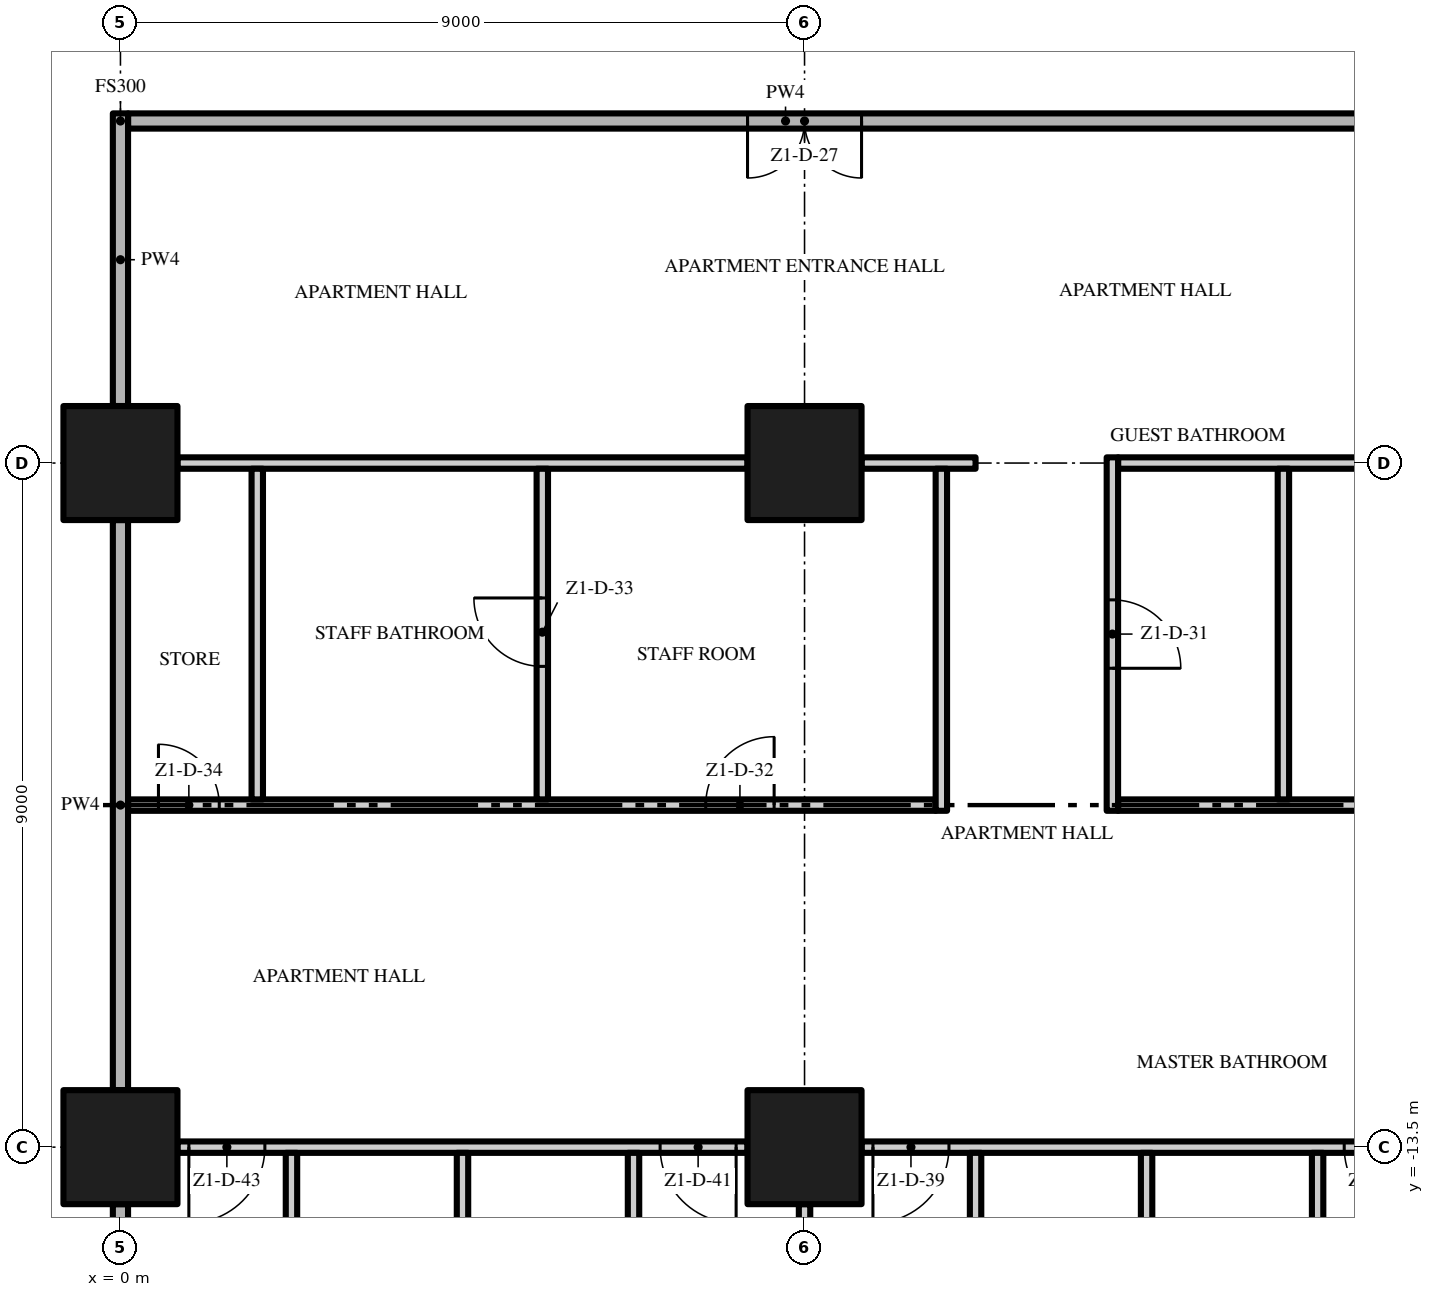
"""IFC4 building model, lengths in metres.
Left out: names, types, materials, properties, quantities, classifications, styles, units other than length and angle.
Written with IfcOpenShell. Run it as: python <this file> out.ifc"""

import sys

from ifc_helpers import new_model, si_unit, direction, frame, frame_2d, origin, origin_2d, place, context, subcontext, project, spatial, rectangle, extrude, element, fill, save


model = new_model("IFC4")
c1 = context("Model", 3, precision=1e-05, world=origin(), true_north=direction((0.0, 1.0)))
c2 = subcontext(c1, "Body", "Model", "MODEL_VIEW")
j1 = project(units=[si_unit("LENGTHUNIT", "METRE"), si_unit("PLANEANGLEUNIT", "RADIAN")], contexts=[c1])
p1 = place(None, origin())
s1 = spatial("IfcSite", under=j1, at=p1, CompositionType="ELEMENT")
p2 = place(p1, origin())
s2 = spatial("IfcBuilding", under=s1, at=p2, CompositionType="ELEMENT")
p3 = place(p2, frame((0.0, 0.0, 53.0)))
s3 = spatial("IfcBuildingStorey", under=s2, at=p3, CompositionType="ELEMENT", Elevation=53.0)
for number, where, z_axis, x_axis in (
    (1, (0.0, -13.5, 0.0), (0.0, 0.0, 1.0), (1.0, 0.0, 0.0)),
    (2, (0.0, -4.5, 0.0), (0.0, 0.0, 1.0), (1.0, 0.0, 0.0)),
    (3, (9.0, -13.5, 0.0), (0.0, 0.0, 1.0), (1.0, 0.0, 0.0)),
    (4, (9.0, -4.5, 0.0), (0.0, 0.0, 1.0), (1.0, 0.0, 0.0)),
):
    element("IfcColumn", number, at=place(p3, frame(where, z_axis=z_axis, x_axis=x_axis)), inside=s3, PredefinedType="COLUMN", context=c2, shape_type="SweptSolid", body=[
        extrude(rectangle(XDim=1.5, YDim=1.5, at=origin_2d()), origin(), (0.0, 0.0, 1.0), 3.5),
    ])
p4 = place(p3, frame((8.25, -13.5, 0.0), z_axis=(0.0, 0.0, 1.0), x_axis=(-1.0, 0.0, 0.0)))
e5 = element("IfcWall", 5, at=p4, inside=s3, PredefinedType="PARTITIONING", context=c2, shape_type="SweptSolid", body=[
    extrude(rectangle(XDim=7.5, YDim=0.15, at=frame_2d((3.75, 0.0))), origin(), (0.0, 0.0, 1.0), 3.5),
])
p5 = place(p4, frame((0.15, 0.0, 0.0)))
e6 = element("IfcOpeningElement", 6, at=p5, cuts=e5, PredefinedType="OPENING", context=c2, shape_type="SweptSolid", body=[
    extrude(rectangle(XDim=1.0, YDim=2.4, at=frame_2d((0.5, 1.2))), frame((0.0, 0.085, 0.0), z_axis=(0.0, -1.0, 0.0), x_axis=(1.0, 0.0, 0.0)), (0.0, 0.0, 1.0), 0.17),
])
p6 = place(p4, frame((6.35, 0.0, 0.0)))
e7 = element("IfcOpeningElement", 7, at=p6, cuts=e5, PredefinedType="OPENING", context=c2, shape_type="SweptSolid", body=[
    extrude(rectangle(XDim=1.0, YDim=2.4, at=frame_2d((0.5, 1.2))), frame((0.0, 0.085, 0.0), z_axis=(0.0, -1.0, 0.0), x_axis=(1.0, 0.0, 0.0)), (0.0, 0.0, 1.0), 0.17),
])
p7 = place(p3, frame((17.25, -13.5, 0.0), z_axis=(0.0, 0.0, 1.0), x_axis=(-1.0, 0.0, 0.0)))
e8 = element("IfcWall", 8, at=p7, inside=s3, PredefinedType="PARTITIONING", context=c2, shape_type="SweptSolid", body=[
    extrude(rectangle(XDim=7.5, YDim=0.15, at=frame_2d((3.75, 0.0))), origin(), (0.0, 0.0, 1.0), 3.5),
])
p8 = place(p7, frame((0.15, 0.0, 0.0)))
e9 = element("IfcOpeningElement", 9, at=p8, cuts=e8, PredefinedType="OPENING", context=c2, shape_type="SweptSolid", body=[
    extrude(rectangle(XDim=1.0, YDim=2.4, at=frame_2d((0.5, 1.2))), frame((0.0, 0.085, 0.0), z_axis=(0.0, -1.0, 0.0), x_axis=(1.0, 0.0, 0.0)), (0.0, 0.0, 1.0), 0.17),
])
p9 = place(p7, frame((6.35, 0.0, 0.0)))
e10 = element("IfcOpeningElement", 10, at=p9, cuts=e8, PredefinedType="OPENING", context=c2, shape_type="SweptSolid", body=[
    extrude(rectangle(XDim=1.0, YDim=2.4, at=frame_2d((0.5, 1.2))), frame((0.0, 0.085, 0.0), z_axis=(0.0, -1.0, 0.0), x_axis=(1.0, 0.0, 0.0)), (0.0, 0.0, 1.0), 0.17),
])
p10 = place(p3, frame((0.1, -9.0, 0.0), z_axis=(0.0, 0.0, 1.0), x_axis=(1.0, 0.0, 0.0)))
e11 = element("IfcWall", 11, at=p10, inside=s3, PredefinedType="PARTITIONING", context=c2, shape_type="SweptSolid", body=[
    extrude(rectangle(XDim=10.625, YDim=0.15, at=frame_2d((5.312, 0.0))), origin(), (0.0, 0.0, 1.0), 3.5),
])
p11 = place(p10, frame((7.6, 0.0, 0.0)))
e12 = element("IfcOpeningElement", 12, at=p11, cuts=e11, PredefinedType="OPENING", context=c2, shape_type="SweptSolid", body=[
    extrude(rectangle(XDim=0.9, YDim=2.1, at=frame_2d((0.45, 1.05))), frame((0.0, 0.085, 0.0), z_axis=(0.0, -1.0, 0.0), x_axis=(1.0, 0.0, 0.0)), (0.0, 0.0, 1.0), 0.17),
])
p12 = place(p10, frame((0.4, 0.0, 0.0)))
e13 = element("IfcOpeningElement", 13, at=p12, cuts=e11, PredefinedType="OPENING", context=c2, shape_type="SweptSolid", body=[
    extrude(rectangle(XDim=0.8, YDim=2.0, at=frame_2d((0.4, 1.0))), frame((0.0, 0.085, 0.0), z_axis=(0.0, -1.0, 0.0), x_axis=(1.0, 0.0, 0.0)), (0.0, 0.0, 1.0), 0.17),
])
p13 = place(p3, frame((13.125, -9.0, 0.0), z_axis=(0.0, 0.0, 1.0), x_axis=(1.0, 0.0, 0.0)))
e14 = element("IfcWall", 14, at=p13, inside=s3, PredefinedType="PARTITIONING", context=c2, shape_type="SweptSolid", body=[
    extrude(rectangle(XDim=13.575, YDim=0.15, at=frame_2d((6.787, 0.0))), origin(), (0.0, 0.0, 1.0), 3.5),
])
p14 = place(p3, frame((0.75, -4.5, 0.0), z_axis=(0.0, 0.0, 1.0), x_axis=(1.0, 0.0, 0.0)))
e15 = element("IfcWall", 15, at=p14, inside=s3, PredefinedType="PARTITIONING", context=c2, shape_type="SweptSolid", body=[
    extrude(rectangle(XDim=7.5, YDim=0.15, at=frame_2d((3.75, 0.0))), origin(), (0.0, 0.0, 1.0), 3.5),
])
p15 = place(p3, frame((9.75, -4.5, 0.0), z_axis=(0.0, 0.0, 1.0), x_axis=(1.0, 0.0, 0.0)))
e16 = element("IfcWall", 16, at=p15, inside=s3, PredefinedType="PARTITIONING", context=c2, shape_type="SweptSolid", body=[
    extrude(rectangle(XDim=1.5, YDim=0.15, at=frame_2d((0.75, 0.0))), origin(), (0.0, 0.0, 1.0), 3.5),
])
p16 = place(p3, frame((13.125, -4.5, 0.0), z_axis=(0.0, 0.0, 1.0), x_axis=(1.0, 0.0, 0.0)))
e17 = element("IfcWall", 17, at=p16, inside=s3, PredefinedType="PARTITIONING", context=c2, shape_type="SweptSolid", body=[
    extrude(rectangle(XDim=4.125, YDim=0.15, at=frame_2d((2.062, 0.0))), origin(), (0.0, 0.0, 1.0), 3.5),
])
p17 = place(p3, frame((17.4, 0.0, 0.0), z_axis=(0.0, 0.0, 1.0), x_axis=(-1.0, 0.0, 0.0)))
e18 = element("IfcWall", 18, at=p17, inside=s3, PredefinedType="PARTITIONING", context=c2, shape_type="SweptSolid", body=[
    extrude(rectangle(XDim=17.3, YDim=0.2, at=frame_2d((8.65, 0.0))), origin(), (0.0, 0.0, 1.0), 3.5),
])
p18 = place(p17, frame((7.65, 0.0, 0.0)))
e19 = element("IfcOpeningElement", 19, at=p18, cuts=e18, PredefinedType="OPENING", context=c2, shape_type="SweptSolid", body=[
    extrude(rectangle(XDim=1.5, YDim=2.4, at=frame_2d((0.75, 1.2))), frame((0.0, 0.11, 0.0), z_axis=(0.0, -1.0, 0.0), x_axis=(1.0, 0.0, 0.0)), (0.0, 0.0, 1.0), 0.22),
])
p19 = place(p3, frame((0.0, -21.1, 0.0), z_axis=(0.0, 0.0, 1.0), x_axis=(0.0, 1.0, 0.0)))
e20 = element("IfcWall", 20, at=p19, inside=s3, PredefinedType="PARTITIONING", context=c2, shape_type="SweptSolid", body=[
    extrude(rectangle(XDim=6.85, YDim=0.2, at=frame_2d((3.425, 0.0))), origin(), (0.0, 0.0, 1.0), 3.5),
])
p20 = place(p3, frame((0.0, -12.75, 0.0), z_axis=(0.0, 0.0, 1.0), x_axis=(0.0, 1.0, 0.0)))
e21 = element("IfcWall", 21, at=p20, inside=s3, PredefinedType="PARTITIONING", context=c2, shape_type="SweptSolid", body=[
    extrude(rectangle(XDim=7.5, YDim=0.2, at=frame_2d((3.75, 0.0))), origin(), (0.0, 0.0, 1.0), 3.5),
])
p21 = place(p3, frame((0.0, -3.75, 0.0), z_axis=(0.0, 0.0, 1.0), x_axis=(0.0, 1.0, 0.0)))
e22 = element("IfcWall", 22, at=p21, inside=s3, PredefinedType="PARTITIONING", context=c2, shape_type="SweptSolid", body=[
    extrude(rectangle(XDim=3.85, YDim=0.2, at=frame_2d((1.925, 0.0))), origin(), (0.0, 0.0, 1.0), 3.5),
])
p22 = place(p3, frame((1.8, -8.925, 0.0), z_axis=(0.0, 0.0, 1.0), x_axis=(0.0, 1.0, 0.0)))
e23 = element("IfcWall", 23, at=p22, inside=s3, PredefinedType="PARTITIONING", context=c2, shape_type="SweptSolid", body=[
    extrude(rectangle(XDim=4.35, YDim=0.15, at=frame_2d((2.175, 0.0))), origin(), (0.0, 0.0, 1.0), 3.5),
])
p23 = place(p3, frame((2.25, -16.575, 0.0), z_axis=(0.0, 0.0, 1.0), x_axis=(0.0, 1.0, 0.0)))
e24 = element("IfcWall", 24, at=p23, inside=s3, PredefinedType="PARTITIONING", context=c2, shape_type="SweptSolid", body=[
    extrude(rectangle(XDim=3.0, YDim=0.15, at=frame_2d((1.5, 0.0))), origin(), (0.0, 0.0, 1.0), 3.5),
])
p24 = place(p3, frame((4.5, -22.2, 0.0), z_axis=(0.0, 0.0, 1.0), x_axis=(0.0, 1.0, 0.0)))
e25 = element("IfcWall", 25, at=p24, inside=s3, PredefinedType="PARTITIONING", context=c2, shape_type="SweptSolid", body=[
    extrude(rectangle(XDim=8.625, YDim=0.15, at=frame_2d((4.312, 0.0))), origin(), (0.0, 0.0, 1.0), 3.5),
])
p25 = place(p3, frame((5.55, -8.925, 0.0), z_axis=(0.0, 0.0, 1.0), x_axis=(0.0, 1.0, 0.0)))
e26 = element("IfcWall", 26, at=p25, inside=s3, PredefinedType="PARTITIONING", context=c2, shape_type="SweptSolid", body=[
    extrude(rectangle(XDim=4.35, YDim=0.15, at=frame_2d((2.175, 0.0))), origin(), (0.0, 0.0, 1.0), 3.5),
])
p26 = place(p25, frame((1.75, 0.0, 0.0)))
e27 = element("IfcOpeningElement", 27, at=p26, cuts=e26, PredefinedType="OPENING", context=c2, shape_type="SweptSolid", body=[
    extrude(rectangle(XDim=0.9, YDim=2.1, at=frame_2d((0.45, 1.05))), frame((0.0, 0.085, 0.0), z_axis=(0.0, -1.0, 0.0), x_axis=(1.0, 0.0, 0.0)), (0.0, 0.0, 1.0), 0.17),
])
p27 = place(p3, frame((6.75, -16.575, 0.0), z_axis=(0.0, 0.0, 1.0), x_axis=(0.0, 1.0, 0.0)))
e28 = element("IfcWall", 28, at=p27, inside=s3, PredefinedType="PARTITIONING", context=c2, shape_type="SweptSolid", body=[
    extrude(rectangle(XDim=3.0, YDim=0.15, at=frame_2d((1.5, 0.0))), origin(), (0.0, 0.0, 1.0), 3.5),
])
p28 = place(p3, frame((9.0, -21.1, 0.0), z_axis=(0.0, 0.0, 1.0), x_axis=(0.0, 1.0, 0.0)))
e29 = element("IfcWall", 29, at=p28, inside=s3, PredefinedType="PARTITIONING", context=c2, shape_type="SweptSolid", body=[
    extrude(rectangle(XDim=6.85, YDim=0.15, at=frame_2d((3.425, 0.0))), origin(), (0.0, 0.0, 1.0), 3.5),
])
p29 = place(p3, frame((10.8, -9.075, 0.0), z_axis=(0.0, 0.0, 1.0), x_axis=(0.0, 1.0, 0.0)))
e30 = element("IfcWall", 30, at=p29, inside=s3, PredefinedType="PARTITIONING", context=c2, shape_type="SweptSolid", body=[
    extrude(rectangle(XDim=4.5, YDim=0.15, at=frame_2d((2.25, 0.0))), origin(), (0.0, 0.0, 1.0), 3.5),
])
p30 = place(p3, frame((11.25, -16.575, 0.0), z_axis=(0.0, 0.0, 1.0), x_axis=(0.0, 1.0, 0.0)))
e31 = element("IfcWall", 31, at=p30, inside=s3, PredefinedType="PARTITIONING", context=c2, shape_type="SweptSolid", body=[
    extrude(rectangle(XDim=3.0, YDim=0.15, at=frame_2d((1.5, 0.0))), origin(), (0.0, 0.0, 1.0), 3.5),
])
p31 = place(p3, frame((13.05, -4.425, 0.0), z_axis=(0.0, 0.0, 1.0), x_axis=(0.0, -1.0, 0.0)))
e32 = element("IfcWall", 32, at=p31, inside=s3, PredefinedType="PARTITIONING", context=c2, shape_type="SweptSolid", body=[
    extrude(rectangle(XDim=4.65, YDim=0.15, at=frame_2d((2.325, 0.0))), origin(), (0.0, 0.0, 1.0), 3.5),
])
p32 = place(p31, frame((1.875, 0.0, 0.0)))
e33 = element("IfcOpeningElement", 33, at=p32, cuts=e32, PredefinedType="OPENING", context=c2, shape_type="SweptSolid", body=[
    extrude(rectangle(XDim=0.9, YDim=2.1, at=frame_2d((0.45, 1.05))), frame((0.0, 0.085, 0.0), z_axis=(0.0, -1.0, 0.0), x_axis=(1.0, 0.0, 0.0)), (0.0, 0.0, 1.0), 0.17),
])
p33 = place(p3, frame((13.5, -22.2, 0.0), z_axis=(0.0, 0.0, 1.0), x_axis=(0.0, 1.0, 0.0)))
e34 = element("IfcWall", 34, at=p33, inside=s3, PredefinedType="PARTITIONING", context=c2, shape_type="SweptSolid", body=[
    extrude(rectangle(XDim=8.625, YDim=0.15, at=frame_2d((4.312, 0.0))), origin(), (0.0, 0.0, 1.0), 3.5),
])
p34 = place(p3, frame((15.3, -8.925, 0.0), z_axis=(0.0, 0.0, 1.0), x_axis=(0.0, 1.0, 0.0)))
e35 = element("IfcWall", 35, at=p34, inside=s3, PredefinedType="PARTITIONING", context=c2, shape_type="SweptSolid", body=[
    extrude(rectangle(XDim=4.35, YDim=0.15, at=frame_2d((2.175, 0.0))), origin(), (0.0, 0.0, 1.0), 3.5),
])
p35 = place(p3, frame((15.75, -16.575, 0.0), z_axis=(0.0, 0.0, 1.0), x_axis=(0.0, 1.0, 0.0)))
e36 = element("IfcWall", 36, at=p35, inside=s3, PredefinedType="PARTITIONING", context=c2, shape_type="SweptSolid", body=[
    extrude(rectangle(XDim=3.0, YDim=0.15, at=frame_2d((1.5, 0.0))), origin(), (0.0, 0.0, 1.0), 3.5),
])
p36 = place(p18, origin())
e37 = element("IfcDoor", 37, at=p36, inside=s3, OperationType="DOUBLE_DOOR_SINGLE_SWING", PredefinedType="DOOR", context=c2, shape_type="SweptSolid", body=[
    extrude(rectangle(XDim=1.5, YDim=2.4, at=frame_2d((0.75, 1.2))), frame((0.0, 0.025, 0.0), z_axis=(0.0, -1.0, 0.0), x_axis=(1.0, 0.0, 0.0)), (0.0, 0.0, 1.0), 0.05),
])
fill(e19, e37)
p37 = place(p32, origin())
e38 = element("IfcDoor", 38, at=p37, inside=s3, OperationType="SINGLE_SWING_RIGHT", PredefinedType="DOOR", context=c2, shape_type="SweptSolid", body=[
    extrude(rectangle(XDim=0.9, YDim=2.1, at=frame_2d((0.45, 1.05))), frame((0.0, 0.025, 0.0), z_axis=(0.0, -1.0, 0.0), x_axis=(1.0, 0.0, 0.0)), (0.0, 0.0, 1.0), 0.05),
])
fill(e33, e38)
p38 = place(p11, origin())
e39 = element("IfcDoor", 39, at=p38, inside=s3, OperationType="SINGLE_SWING_RIGHT", PredefinedType="DOOR", context=c2, shape_type="SweptSolid", body=[
    extrude(rectangle(XDim=0.9, YDim=2.1, at=frame_2d((0.45, 1.05))), frame((0.0, 0.025, 0.0), z_axis=(0.0, -1.0, 0.0), x_axis=(1.0, 0.0, 0.0)), (0.0, 0.0, 1.0), 0.05),
])
fill(e12, e39)
p39 = place(p26, origin())
e40 = element("IfcDoor", 40, at=p39, inside=s3, OperationType="SINGLE_SWING_RIGHT", PredefinedType="DOOR", context=c2, shape_type="SweptSolid", body=[
    extrude(rectangle(XDim=0.9, YDim=2.1, at=frame_2d((0.45, 1.05))), frame((0.0, 0.025, 0.0), z_axis=(0.0, -1.0, 0.0), x_axis=(1.0, 0.0, 0.0)), (0.0, 0.0, 1.0), 0.05),
])
fill(e27, e40)
p40 = place(p12, origin())
e41 = element("IfcDoor", 41, at=p40, inside=s3, OperationType="SINGLE_SWING_LEFT", PredefinedType="DOOR", context=c2, shape_type="SweptSolid", body=[
    extrude(rectangle(XDim=0.8, YDim=2.0, at=frame_2d((0.4, 1.0))), frame((0.0, 0.025, 0.0), z_axis=(0.0, -1.0, 0.0), x_axis=(1.0, 0.0, 0.0)), (0.0, 0.0, 1.0), 0.05),
])
fill(e13, e41)
p41 = place(p8, origin())
e42 = element("IfcDoor", 42, at=p41, inside=s3, OperationType="SINGLE_SWING_LEFT", PredefinedType="DOOR", context=c2, shape_type="SweptSolid", body=[
    extrude(rectangle(XDim=1.0, YDim=2.4, at=frame_2d((0.5, 1.2))), frame((0.0, 0.025, 0.0), z_axis=(0.0, -1.0, 0.0), x_axis=(1.0, 0.0, 0.0)), (0.0, 0.0, 1.0), 0.05),
])
fill(e9, e42)
p42 = place(p9, origin())
e43 = element("IfcDoor", 43, at=p42, inside=s3, OperationType="SINGLE_SWING_RIGHT", PredefinedType="DOOR", context=c2, shape_type="SweptSolid", body=[
    extrude(rectangle(XDim=1.0, YDim=2.4, at=frame_2d((0.5, 1.2))), frame((0.0, 0.025, 0.0), z_axis=(0.0, -1.0, 0.0), x_axis=(1.0, 0.0, 0.0)), (0.0, 0.0, 1.0), 0.05),
])
fill(e10, e43)
p43 = place(p5, origin())
e44 = element("IfcDoor", 44, at=p43, inside=s3, OperationType="SINGLE_SWING_LEFT", PredefinedType="DOOR", context=c2, shape_type="SweptSolid", body=[
    extrude(rectangle(XDim=1.0, YDim=2.4, at=frame_2d((0.5, 1.2))), frame((0.0, 0.025, 0.0), z_axis=(0.0, -1.0, 0.0), x_axis=(1.0, 0.0, 0.0)), (0.0, 0.0, 1.0), 0.05),
])
fill(e6, e44)
p44 = place(p6, origin())
e45 = element("IfcDoor", 45, at=p44, inside=s3, OperationType="SINGLE_SWING_RIGHT", PredefinedType="DOOR", context=c2, shape_type="SweptSolid", body=[
    extrude(rectangle(XDim=1.0, YDim=2.4, at=frame_2d((0.5, 1.2))), frame((0.0, 0.025, 0.0), z_axis=(0.0, -1.0, 0.0), x_axis=(1.0, 0.0, 0.0)), (0.0, 0.0, 1.0), 0.05),
])
fill(e7, e45)
save(model, sys.argv[1])
